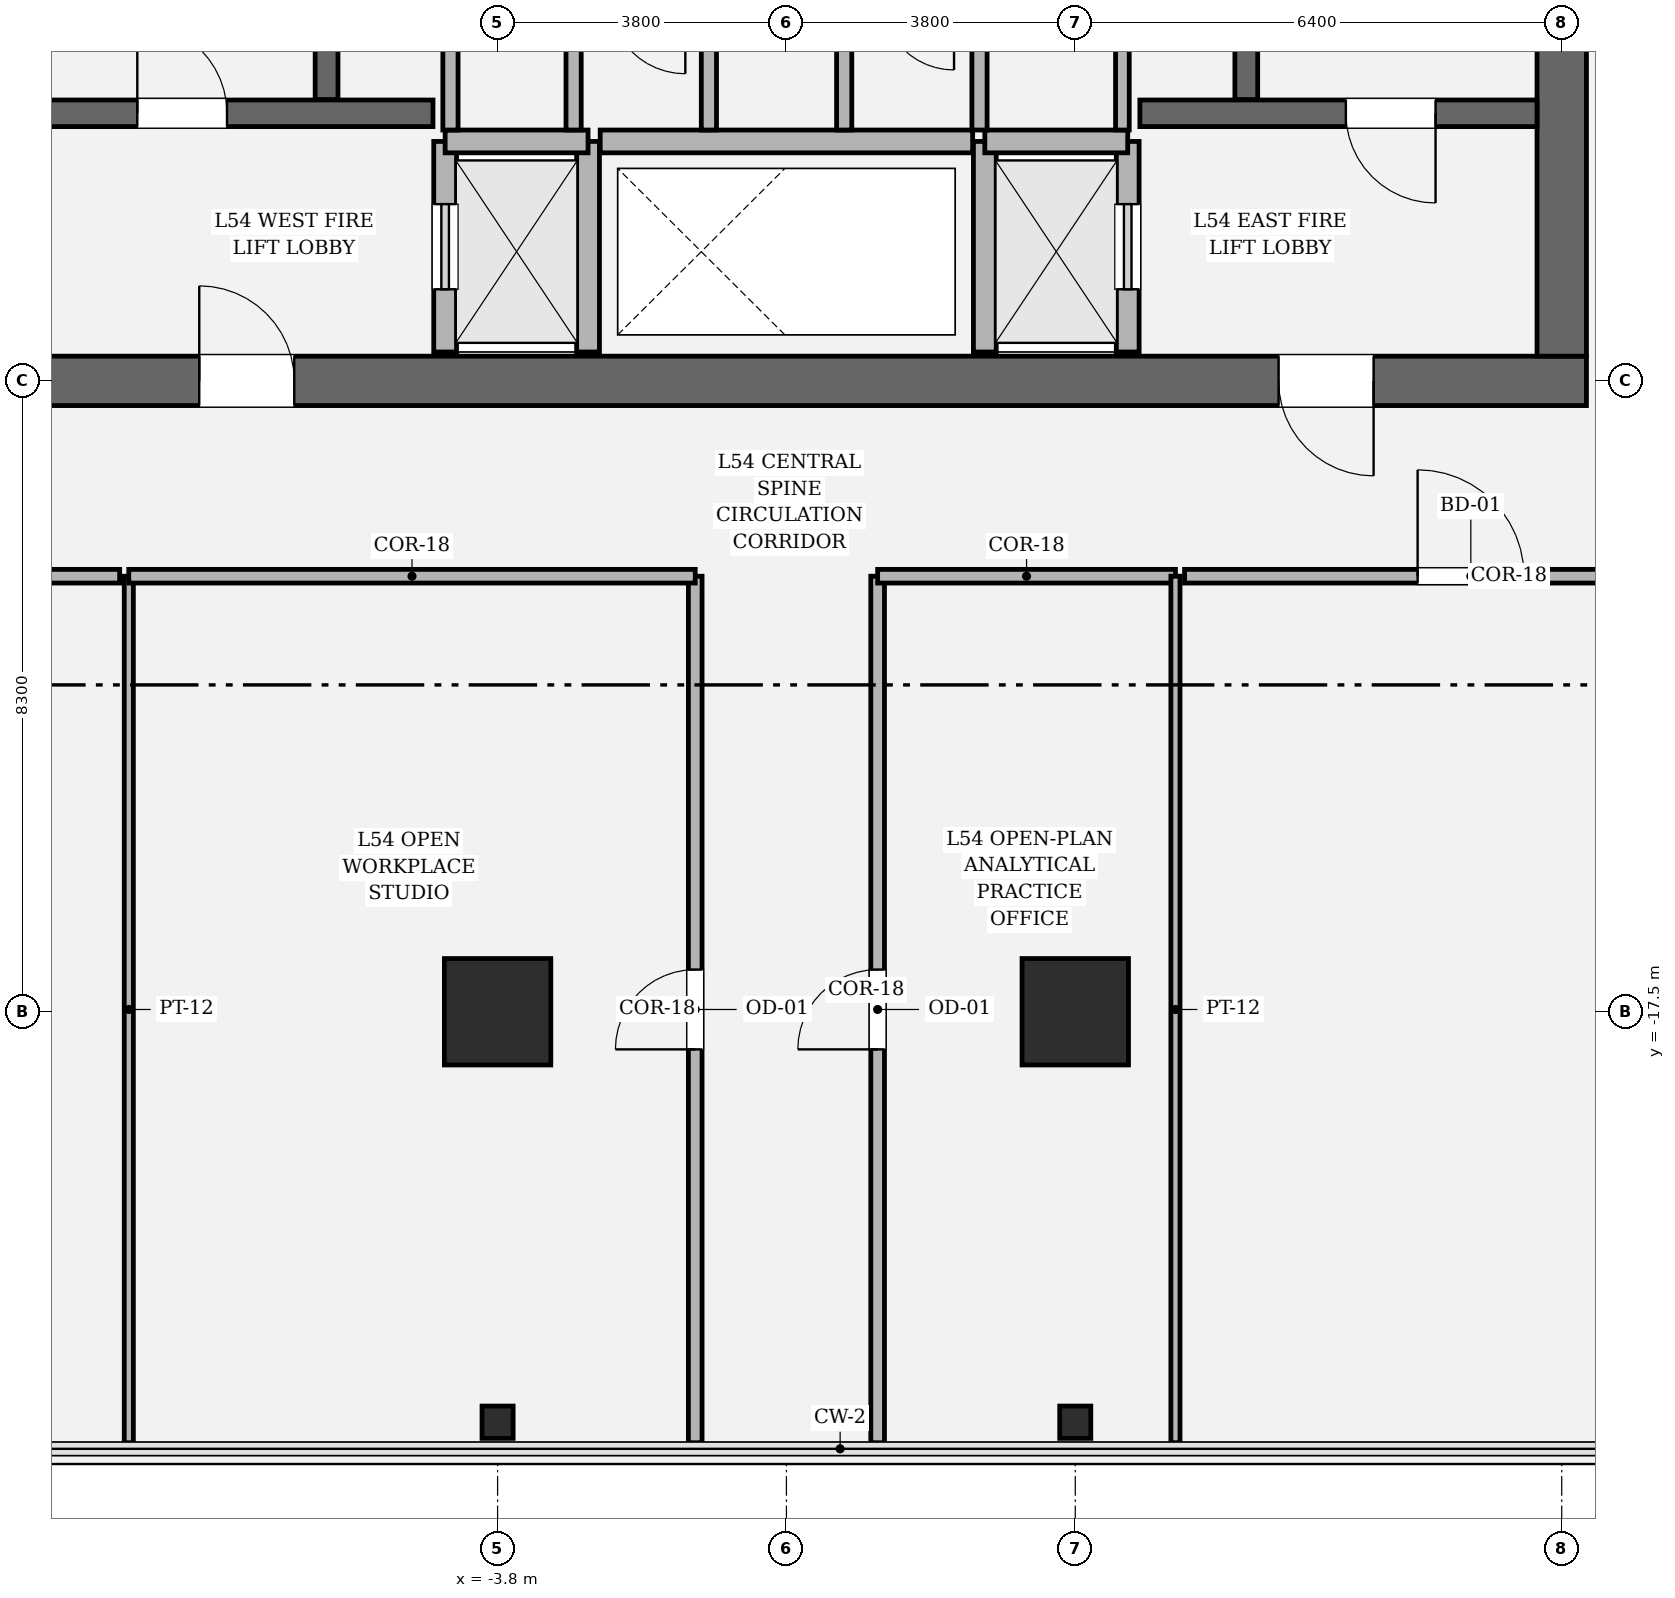
"""IFC4 building model, lengths in metres.
Left out: names, types, materials, properties, quantities, classifications, styles, units other than length and angle.
Written with IfcOpenShell. Run it as: python <this file> out.ifc"""

import sys

from ifc_helpers import new_model, si_unit, direction, frame, frame_2d, origin, origin_2d, place, context, subcontext, project, spatial, rectangle, hollow_rectangle, i_section, extrude, element, fill, save


model = new_model("IFC4")
c1 = context("Model", 3, precision=1e-05, world=origin(), true_north=direction((0.0, 1.0)))
c2 = subcontext(c1, "Body", "Model", "MODEL_VIEW")
j1 = project(units=[si_unit("LENGTHUNIT", "METRE"), si_unit("PLANEANGLEUNIT", "RADIAN")], contexts=[c1])
p1 = place(None, origin())
s1 = spatial("IfcSite", under=j1, at=p1, CompositionType="ELEMENT")
p2 = place(p1, origin())
s2 = spatial("IfcBuilding", under=s1, at=p2, CompositionType="ELEMENT")
p3 = place(p2, frame((0.0, 0.0, 228.9)))
s3 = spatial("IfcBuildingStorey", under=s2, at=p3, CompositionType="ELEMENT", Elevation=228.9)
p4 = place(p3, frame((10.525, -9.2, 0.0), z_axis=(0.0, 0.0, 1.0), x_axis=(-1.0, 0.0, 0.0)))
e1 = element("IfcWall", 1, at=p4, inside=s3, PredefinedType="SHEAR", context=c2, shape_type="SweptSolid", body=[
    extrude(rectangle(XDim=21.05, YDim=0.65, at=frame_2d((10.525, 0.0))), origin(), (0.0, 0.0, 1.0), 4.05),
])
p5 = place(p4, frame((2.8, 0.0, 0.0)))
e2 = element("IfcOpeningElement", 2, at=p5, cuts=e1, PredefinedType="OPENING", context=c2, shape_type="SweptSolid", body=[
    extrude(rectangle(XDim=1.25, YDim=2.25, at=frame_2d((0.625, 1.125))), frame((0.0, 0.335, 0.0), z_axis=(0.0, -1.0, 0.0), x_axis=(1.0, 0.0, 0.0)), (0.0, 0.0, 1.0), 0.67),
])
p6 = place(p4, frame((17.0, 0.0, 0.0)))
e3 = element("IfcOpeningElement", 3, at=p6, cuts=e1, PredefinedType="OPENING", context=c2, shape_type="SweptSolid", body=[
    extrude(rectangle(XDim=1.25, YDim=2.25, at=frame_2d((0.625, 1.125))), frame((0.0, 0.335, 0.0), z_axis=(0.0, -1.0, 0.0), x_axis=(1.0, 0.0, 0.0)), (0.0, 0.0, 1.0), 0.67),
])
p7 = place(p3, frame((10.2, 8.875, 0.0), z_axis=(0.0, 0.0, 1.0), x_axis=(0.0, -1.0, 0.0)))
e4 = element("IfcWall", 4, at=p7, inside=s3, PredefinedType="SHEAR", context=c2, shape_type="SweptSolid", body=[
    extrude(rectangle(XDim=17.75, YDim=0.65, at=frame_2d((8.875, 0.0))), origin(), (0.0, 0.0, 1.0), 4.05),
])
p8 = place(p7, frame((3.905, 0.0, 0.0)))
e5 = element("IfcOpeningElement", 5, at=p8, cuts=e4, PredefinedType="OPENING", context=c2, shape_type="SweptSolid", body=[
    extrude(rectangle(XDim=1.18, YDim=2.2, at=frame_2d((0.59, 1.1))), frame((0.0, 0.335, 0.0), z_axis=(0.0, -1.0, 0.0), x_axis=(1.0, 0.0, 0.0)), (0.0, 0.0, 1.0), 0.67),
])
for number, where, z_axis, x_axis in (
    (6, (-6.05, -5.5, 0.0), (0.0, 0.0, 1.0), (0.0, 1.0, 0.0)),
    (7, (6.05, 3.45, 0.0), (0.0, 0.0, 1.0), (0.0, -1.0, 0.0)),
):
    element("IfcWall", number, at=place(p3, frame(where, z_axis=z_axis, x_axis=x_axis)), inside=s3, PredefinedType="SOLIDWALL", context=c2, shape_type="SweptSolid", body=[
        extrude(rectangle(XDim=8.95, YDim=0.3, at=frame_2d((4.475, 0.0))), origin(), (0.0, 0.0, 1.0), 4.05),
    ])
p9 = place(p3, frame((-9.875, -5.68, 0.0), z_axis=(0.0, 0.0, 1.0), x_axis=(1.0, 0.0, 0.0)))
e8 = element("IfcWall", 8, at=p9, inside=s3, PredefinedType="SOLIDWALL", context=c2, shape_type="SweptSolid", body=[
    extrude(rectangle(XDim=5.225, YDim=0.35, at=frame_2d((2.613, 0.0))), origin(), (0.0, 0.0, 1.0), 4.05),
])
p10 = place(p9, frame((1.335, 0.0, 0.0)))
e9 = element("IfcOpeningElement", 9, at=p10, cuts=e8, PredefinedType="OPENING", context=c2, shape_type="SweptSolid", body=[
    extrude(rectangle(XDim=1.18, YDim=2.2, at=frame_2d((0.59, 1.1))), frame((0.0, 0.185, 0.0), z_axis=(0.0, -1.0, 0.0), x_axis=(1.0, 0.0, 0.0)), (0.0, 0.0, 1.0), 0.37),
])
p11 = place(p3, frame((4.65, -5.68, 0.0), z_axis=(0.0, 0.0, 1.0), x_axis=(1.0, 0.0, 0.0)))
e10 = element("IfcWall", 10, at=p11, inside=s3, PredefinedType="SOLIDWALL", context=c2, shape_type="SweptSolid", body=[
    extrude(rectangle(XDim=5.225, YDim=0.35, at=frame_2d((2.613, 0.0))), origin(), (0.0, 0.0, 1.0), 4.05),
])
p12 = place(p11, frame((2.71, 0.0, 0.0)))
e11 = element("IfcOpeningElement", 11, at=p12, cuts=e10, PredefinedType="OPENING", context=c2, shape_type="SweptSolid", body=[
    extrude(rectangle(XDim=1.18, YDim=2.2, at=frame_2d((0.59, 1.1))), frame((0.0, 0.185, 0.0), z_axis=(0.0, -1.0, 0.0), x_axis=(1.0, 0.0, 0.0)), (0.0, 0.0, 1.0), 0.37),
])
for number, where, z_axis, x_axis in (
    (12, (-3.8, -17.5, 0.0), (0.0, 0.0, 1.0), (1.0, 0.0, 0.0)),
    (13, (3.8, -17.5, 0.0), (0.0, 0.0, 1.0), (1.0, 0.0, 0.0)),
):
    element("IfcColumn", number, at=place(p3, frame(where, z_axis=z_axis, x_axis=x_axis)), inside=s3, PredefinedType="COLUMN", context=c2, shape_type="SweptSolid", body=[
        extrude(hollow_rectangle(XDim=1.4, YDim=1.4, WallThickness=0.042, at=origin_2d()), origin(), (0.0, 0.0, 1.0), 4.05),
    ])
for number, where, z_axis, x_axis in (
    (14, (-3.8, -22.9, 0.0), (0.0, 0.0, 1.0), (1.0, 0.0, 0.0)),
    (15, (3.8, -22.9, 0.0), (0.0, 0.0, 1.0), (1.0, 0.0, 0.0)),
):
    element("IfcColumn", number, at=place(p3, frame(where, z_axis=z_axis, x_axis=x_axis)), inside=s3, PredefinedType="COLUMN", context=c2, shape_type="SweptSolid", body=[
        extrude(i_section(OverallWidth=0.409, OverallDepth=0.425, WebThickness=0.032, FlangeThickness=0.052, FilletRadius=0.018, at=origin_2d()), origin(), (0.0, 0.0, 1.0), 4.048),
    ])
p13 = place(p3, frame((-4.49, -8.82, 0.0), z_axis=(0.0, 0.0, 1.0), x_axis=(0.0, 1.0, 0.0)))
e16 = element("IfcWall", 16, at=p13, inside=s3, PredefinedType="SOLIDWALL", context=c2, shape_type="SweptSolid", body=[
    extrude(rectangle(XDim=2.77, YDim=0.3, at=frame_2d((1.385, 0.0))), origin(), (0.0, 0.0, 1.0), 3.83),
])
p14 = place(p13, frame((0.825, 0.0, 0.0)))
e17 = element("IfcOpeningElement", 17, at=p14, cuts=e16, PredefinedType="OPENING", context=c2, shape_type="SweptSolid", body=[
    extrude(rectangle(XDim=1.12, YDim=2.25, at=frame_2d((0.56, 1.125))), frame((0.0, 0.16, 0.0), z_axis=(0.0, -1.0, 0.0), x_axis=(1.0, 0.0, 0.0)), (0.0, 0.0, 1.0), 0.32),
])
p15 = place(p3, frame((-2.61, -8.82, 0.0), z_axis=(0.0, 0.0, 1.0), x_axis=(0.0, 1.0, 0.0)))
e18 = element("IfcWall", 18, at=p15, inside=s3, PredefinedType="SOLIDWALL", context=c2, shape_type="SweptSolid", body=[
    extrude(rectangle(XDim=2.77, YDim=0.3, at=frame_2d((1.385, 0.0))), origin(), (0.0, 0.0, 1.0), 3.83),
])
p16 = place(p3, frame((-4.49, -6.05, 0.0), z_axis=(0.0, 0.0, 1.0), x_axis=(1.0, 0.0, 0.0)))
e19 = element("IfcWall", 19, at=p16, inside=s3, PredefinedType="SOLIDWALL", context=c2, shape_type="SweptSolid", body=[
    extrude(rectangle(XDim=1.88, YDim=0.3, at=frame_2d((0.94, 0.0))), origin(), (0.0, 0.0, 1.0), 3.83),
])
p17 = place(p3, frame((4.49, -8.82, 0.0), z_axis=(0.0, 0.0, 1.0), x_axis=(0.0, 1.0, 0.0)))
e20 = element("IfcWall", 20, at=p17, inside=s3, PredefinedType="SOLIDWALL", context=c2, shape_type="SweptSolid", body=[
    extrude(rectangle(XDim=2.77, YDim=0.3, at=frame_2d((1.385, 0.0))), origin(), (0.0, 0.0, 1.0), 3.83),
])
p18 = place(p17, frame((0.825, 0.0, 0.0)))
e21 = element("IfcOpeningElement", 21, at=p18, cuts=e20, PredefinedType="OPENING", context=c2, shape_type="SweptSolid", body=[
    extrude(rectangle(XDim=1.12, YDim=2.25, at=frame_2d((0.56, 1.125))), frame((0.0, 0.16, 0.0), z_axis=(0.0, -1.0, 0.0), x_axis=(1.0, 0.0, 0.0)), (0.0, 0.0, 1.0), 0.32),
])
p19 = place(p3, frame((2.61, -8.82, 0.0), z_axis=(0.0, 0.0, 1.0), x_axis=(0.0, 1.0, 0.0)))
e22 = element("IfcWall", 22, at=p19, inside=s3, PredefinedType="SOLIDWALL", context=c2, shape_type="SweptSolid", body=[
    extrude(rectangle(XDim=2.77, YDim=0.3, at=frame_2d((1.385, 0.0))), origin(), (0.0, 0.0, 1.0), 3.83),
])
p20 = place(p3, frame((2.61, -6.05, 0.0), z_axis=(0.0, 0.0, 1.0), x_axis=(1.0, 0.0, 0.0)))
e23 = element("IfcWall", 23, at=p20, inside=s3, PredefinedType="SOLIDWALL", context=c2, shape_type="SweptSolid", body=[
    extrude(rectangle(XDim=1.88, YDim=0.3, at=frame_2d((0.94, 0.0))), origin(), (0.0, 0.0, 1.0), 3.83),
])
p21 = place(p3, frame((-2.45, -6.05, 0.0), z_axis=(0.0, 0.0, 1.0), x_axis=(1.0, 0.0, 0.0)))
e24 = element("IfcWall", 24, at=p21, inside=s3, PredefinedType="SOLIDWALL", context=c2, shape_type="SweptSolid", body=[
    extrude(rectangle(XDim=4.9, YDim=0.3, at=frame_2d((2.45, 0.0))), origin(), (0.0, 0.0, 1.0), 3.83),
])
for number, where, z_axis, x_axis in (
    (25, (-2.8, -5.9, 0.0), (0.0, 0.0, 1.0), (0.0, 1.0, 0.0)),
    (26, (-4.42, -4.16, 0.0), (0.0, 0.0, 1.0), (0.0, -1.0, 0.0)),
    (27, (-1.02, -5.9, 0.0), (0.0, 0.0, 1.0), (0.0, 1.0, 0.0)),
    (28, (0.76, -5.9, 0.0), (0.0, 0.0, 1.0), (0.0, 1.0, 0.0)),
    (29, (2.54, -5.9, 0.0), (0.0, 0.0, 1.0), (0.0, 1.0, 0.0)),
):
    element("IfcWall", number, at=place(p3, frame(where, z_axis=z_axis, x_axis=x_axis)), inside=s3, PredefinedType="SOLIDWALL", context=c2, shape_type="SweptSolid", body=[
        extrude(rectangle(XDim=1.74, YDim=0.2, at=frame_2d((0.87, 0.0))), origin(), (0.0, 0.0, 1.0), 3.83),
    ])
p22 = place(p3, frame((4.42, -5.9, 0.0), z_axis=(0.0, 0.0, 1.0), x_axis=(0.0, 1.0, 0.0)))
e30 = element("IfcWall", 30, at=p22, inside=s3, PredefinedType="PARTITIONING", context=c2, shape_type="SweptSolid", body=[
    extrude(rectangle(XDim=1.74, YDim=0.18, at=frame_2d((0.87, 0.0))), origin(), (0.0, 0.0, 1.0), 3.83),
])
p23 = place(p3, frame((-1.2, -11.77, 0.0), z_axis=(0.0, 0.0, 1.0), x_axis=(0.0, -1.0, 0.0)))
e31 = element("IfcWall", 31, at=p23, inside=s3, PredefinedType="PARTITIONING", context=c2, shape_type="SweptSolid", body=[
    extrude(rectangle(XDim=11.4, YDim=0.18, at=frame_2d((5.7, 0.0))), origin(), (0.0, 0.0, 1.0), 2.544),
])
p24 = place(p23, frame((5.175, 0.0, 0.0)))
e32 = element("IfcOpeningElement", 32, at=p24, cuts=e31, PredefinedType="OPENING", context=c2, shape_type="SweptSolid", body=[
    extrude(rectangle(XDim=1.05, YDim=2.2, at=frame_2d((0.525, 1.1))), frame((0.0, 0.1, 0.0), z_axis=(0.0, -1.0, 0.0), x_axis=(1.0, 0.0, 0.0)), (0.0, 0.0, 1.0), 0.2),
])
p25 = place(p3, frame((-8.652, -23.17, 0.0), z_axis=(0.0, 0.0, 1.0), x_axis=(0.0, 1.0, 0.0)))
e33 = element("IfcWall", 33, at=p25, inside=s3, PredefinedType="PARTITIONING", context=c2, shape_type="SweptSolid", body=[
    extrude(rectangle(XDim=11.4, YDim=0.12, at=frame_2d((5.7, 0.0))), origin(), (0.0, 0.0, 1.0), 2.544),
])
p26 = place(p3, frame((-8.652, -11.77, 0.0), z_axis=(0.0, 0.0, 1.0), x_axis=(1.0, 0.0, 0.0)))
e34 = element("IfcWall", 34, at=p26, inside=s3, PredefinedType="PARTITIONING", context=c2, shape_type="SweptSolid", body=[
    extrude(rectangle(XDim=7.452, YDim=0.18, at=frame_2d((3.726, 0.0))), origin(), (0.0, 0.0, 1.0), 3.174),
])
p27 = place(p3, frame((1.2, -23.17, 0.0), z_axis=(0.0, 0.0, 1.0), x_axis=(0.0, 1.0, 0.0)))
e35 = element("IfcWall", 35, at=p27, inside=s3, PredefinedType="PARTITIONING", context=c2, shape_type="SweptSolid", body=[
    extrude(rectangle(XDim=11.4, YDim=0.18, at=frame_2d((5.7, 0.0))), origin(), (0.0, 0.0, 1.0), 2.544),
])
p28 = place(p27, frame((5.175, 0.0, 0.0)))
e36 = element("IfcOpeningElement", 36, at=p28, cuts=e35, PredefinedType="OPENING", context=c2, shape_type="SweptSolid", body=[
    extrude(rectangle(XDim=1.05, YDim=2.2, at=frame_2d((0.525, 1.1))), frame((0.0, 0.1, 0.0), z_axis=(0.0, -1.0, 0.0), x_axis=(1.0, 0.0, 0.0)), (0.0, 0.0, 1.0), 0.2),
])
p29 = place(p3, frame((1.2, -11.77, 0.0), z_axis=(0.0, 0.0, 1.0), x_axis=(1.0, 0.0, 0.0)))
e37 = element("IfcWall", 37, at=p29, inside=s3, PredefinedType="PARTITIONING", context=c2, shape_type="SweptSolid", body=[
    extrude(rectangle(XDim=3.918, YDim=0.18, at=frame_2d((1.959, 0.0))), origin(), (0.0, 0.0, 1.0), 3.174),
])
p30 = place(p3, frame((5.118, -11.77, 0.0), z_axis=(0.0, 0.0, 1.0), x_axis=(0.0, -1.0, 0.0)))
e38 = element("IfcWall", 38, at=p30, inside=s3, PredefinedType="PARTITIONING", context=c2, shape_type="SweptSolid", body=[
    extrude(rectangle(XDim=11.4, YDim=0.12, at=frame_2d((5.7, 0.0))), origin(), (0.0, 0.0, 1.0), 3.174),
])
p31 = place(p3, frame((-12.77, -11.77, 0.0), z_axis=(0.0, 0.0, 1.0), x_axis=(1.0, 0.0, 0.0)))
e39 = element("IfcWall", 39, at=p31, inside=s3, PredefinedType="PARTITIONING", context=c2, shape_type="SweptSolid", body=[
    extrude(rectangle(XDim=3.998, YDim=0.18, at=frame_2d((1.999, 0.0))), origin(), (0.0, 0.0, 1.0), 3.174),
])
p32 = place(p31, frame((1.474, 0.0, 0.0)))
e40 = element("IfcOpeningElement", 40, at=p32, cuts=e39, PredefinedType="OPENING", context=c2, shape_type="SweptSolid", body=[
    extrude(rectangle(XDim=1.05, YDim=2.2, at=frame_2d((0.525, 1.1))), frame((0.0, 0.1, 0.0), z_axis=(0.0, -1.0, 0.0), x_axis=(1.0, 0.0, 0.0)), (0.0, 0.0, 1.0), 0.2),
])
p33 = place(p3, frame((5.238, -11.77, 0.0), z_axis=(0.0, 0.0, 1.0), x_axis=(1.0, 0.0, 0.0)))
e41 = element("IfcWall", 41, at=p33, inside=s3, PredefinedType="PARTITIONING", context=c2, shape_type="SweptSolid", body=[
    extrude(rectangle(XDim=7.532, YDim=0.18, at=frame_2d((3.766, 0.0))), origin(), (0.0, 0.0, 1.0), 3.174),
])
p34 = place(p33, frame((3.066, 0.0, 0.0)))
e42 = element("IfcOpeningElement", 42, at=p34, cuts=e41, PredefinedType="OPENING", context=c2, shape_type="SweptSolid", body=[
    extrude(rectangle(XDim=1.4, YDim=2.25, at=frame_2d((0.7, 1.125))), frame((0.0, 0.1, 0.0), z_axis=(0.0, -1.0, 0.0), x_axis=(1.0, 0.0, 0.0)), (0.0, 0.0, 1.0), 0.2),
])
p35 = place(p10, origin())
e43 = element("IfcDoor", 43, at=p35, inside=s3, OperationType="SINGLE_SWING_LEFT", PredefinedType="DOOR", context=c2, shape_type="SweptSolid", body=[
    extrude(rectangle(XDim=1.18, YDim=2.2, at=frame_2d((0.59, 1.1))), frame((0.0, 0.025, 0.0), z_axis=(0.0, -1.0, 0.0), x_axis=(1.0, 0.0, 0.0)), (0.0, 0.0, 1.0), 0.05),
])
fill(e9, e43)
p36 = place(p12, origin())
e44 = element("IfcDoor", 44, at=p36, inside=s3, OperationType="SINGLE_SWING_RIGHT", PredefinedType="DOOR", context=c2, shape_type="SweptSolid", body=[
    extrude(rectangle(XDim=1.18, YDim=2.2, at=frame_2d((0.59, 1.1))), frame((0.0, 0.025, 0.0), z_axis=(0.0, -1.0, 0.0), x_axis=(1.0, 0.0, 0.0)), (0.0, 0.0, 1.0), 0.05),
])
fill(e11, e44)
p37 = place(p5, origin())
e45 = element("IfcDoor", 45, at=p37, inside=s3, OperationType="SINGLE_SWING_LEFT", PredefinedType="DOOR", context=c2, shape_type="SweptSolid", body=[
    extrude(rectangle(XDim=1.25, YDim=2.25, at=frame_2d((0.625, 1.125))), frame((0.0, 0.025, 0.0), z_axis=(0.0, -1.0, 0.0), x_axis=(1.0, 0.0, 0.0)), (0.0, 0.0, 1.0), 0.05),
])
fill(e2, e45)
p38 = place(p6, origin())
e46 = element("IfcDoor", 46, at=p38, inside=s3, OperationType="SINGLE_SWING_RIGHT", PredefinedType="DOOR", context=c2, shape_type="SweptSolid", body=[
    extrude(rectangle(XDim=1.25, YDim=2.25, at=frame_2d((0.625, 1.125))), frame((0.0, 0.025, 0.0), z_axis=(0.0, -1.0, 0.0), x_axis=(1.0, 0.0, 0.0)), (0.0, 0.0, 1.0), 0.05),
])
fill(e3, e46)
p39 = place(p14, origin())
e47 = element("IfcDoor", 47, at=p39, inside=s3, OperationType="SLIDING_TO_LEFT", PredefinedType="DOOR", context=c2, shape_type="SweptSolid", body=[
    extrude(rectangle(XDim=1.12, YDim=2.25, at=frame_2d((0.56, 1.125))), frame((0.0, 0.025, 0.0), z_axis=(0.0, -1.0, 0.0), x_axis=(1.0, 0.0, 0.0)), (0.0, 0.0, 1.0), 0.05),
])
fill(e17, e47)
p40 = place(p18, origin())
e48 = element("IfcDoor", 48, at=p40, inside=s3, OperationType="SLIDING_TO_RIGHT", PredefinedType="DOOR", context=c2, shape_type="SweptSolid", body=[
    extrude(rectangle(XDim=1.12, YDim=2.25, at=frame_2d((0.56, 1.125))), frame((0.0, 0.025, 0.0), z_axis=(0.0, -1.0, 0.0), x_axis=(1.0, 0.0, 0.0)), (0.0, 0.0, 1.0), 0.05),
])
fill(e21, e48)
p41 = place(p24, origin())
e49 = element("IfcDoor", 49, at=p41, inside=s3, OperationType="SINGLE_SWING_RIGHT", PredefinedType="DOOR", context=c2, shape_type="SweptSolid", body=[
    extrude(rectangle(XDim=1.05, YDim=2.2, at=frame_2d((0.525, 1.1))), frame((0.0, 0.025, 0.0), z_axis=(0.0, -1.0, 0.0), x_axis=(1.0, 0.0, 0.0)), (0.0, 0.0, 1.0), 0.05),
])
fill(e32, e49)
p42 = place(p28, origin())
e50 = element("IfcDoor", 50, at=p42, inside=s3, OperationType="SINGLE_SWING_LEFT", PredefinedType="DOOR", context=c2, shape_type="SweptSolid", body=[
    extrude(rectangle(XDim=1.05, YDim=2.2, at=frame_2d((0.525, 1.1))), frame((0.0, 0.025, 0.0), z_axis=(0.0, -1.0, 0.0), x_axis=(1.0, 0.0, 0.0)), (0.0, 0.0, 1.0), 0.05),
])
fill(e36, e50)
p43 = place(p34, origin())
e51 = element("IfcDoor", 51, at=p43, inside=s3, OperationType="SINGLE_SWING_LEFT", PredefinedType="DOOR", context=c2, shape_type="SweptSolid", body=[
    extrude(rectangle(XDim=1.4, YDim=2.25, at=frame_2d((0.7, 1.125))), frame((0.0, 0.025, 0.0), z_axis=(0.0, -1.0, 0.0), x_axis=(1.0, 0.0, 0.0)), (0.0, 0.0, 1.0), 0.05),
])
fill(e42, e51)
save(model, sys.argv[1])
